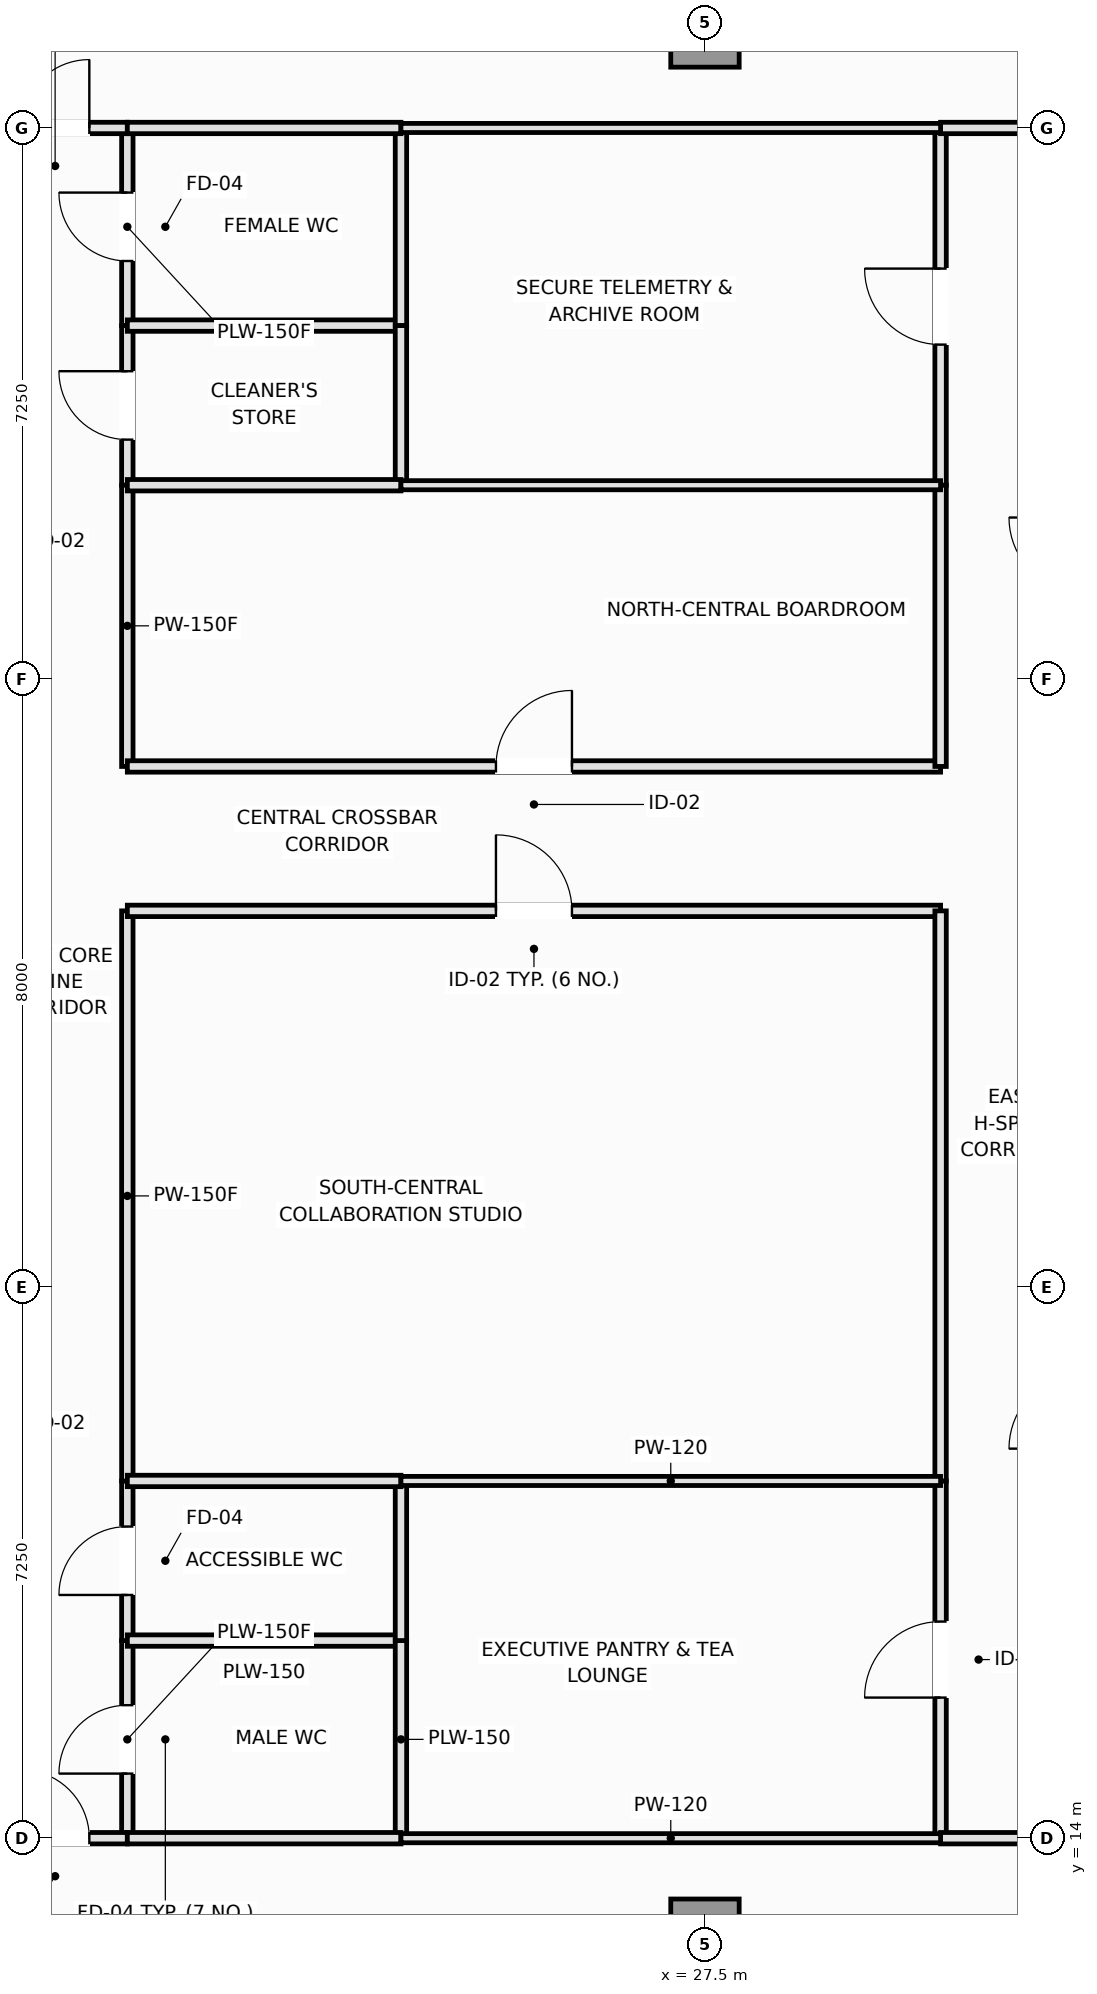
"""IFC4 building model, lengths in metres.
Left out: names, types, materials, properties, quantities, classifications, styles, units other than length and angle.
Written with IfcOpenShell. Run it as: python <this file> out.ifc"""

import sys

from ifc_helpers import new_model, si_unit, direction, frame, frame_2d, origin, origin_2d, place, context, subcontext, project, spatial, rectangle, extrude, element, fill, save


model = new_model("IFC4")
c1 = context("Model", 3, precision=1e-05, world=origin(), true_north=direction((0.0, 1.0)))
c2 = subcontext(c1, "Body", "Model", "MODEL_VIEW")
j1 = project(units=[si_unit("LENGTHUNIT", "METRE"), si_unit("PLANEANGLEUNIT", "RADIAN")], contexts=[c1])
p1 = place(None, origin())
s1 = spatial("IfcSite", under=j1, at=p1, CompositionType="ELEMENT")
p2 = place(p1, origin())
s2 = spatial("IfcBuilding", under=s1, at=p2, CompositionType="ELEMENT")
p3 = place(p2, frame((0.0, 0.0, 259.9)))
s3 = spatial("IfcBuildingStorey", under=s2, at=p3, CompositionType="ELEMENT", Elevation=259.9)
for number, where, z_axis, x_axis in (
    (1, (27.5, 12.75, 0.0), (0.0, 0.0, 1.0), (1.0, 0.0, 0.0)),
    (2, (27.5, 37.75, 0.0), (0.0, 0.0, 1.0), (1.0, 0.0, 0.0)),
):
    element("IfcColumn", number, at=place(p3, frame(where, z_axis=z_axis, x_axis=x_axis)), inside=s3, PredefinedType="COLUMN", context=c2, shape_type="SweptSolid", body=[
        extrude(rectangle(XDim=0.9, YDim=0.9, at=origin_2d()), origin(), (0.0, 0.0, 1.0), 3.55),
    ])
p4 = place(p3, frame((19.9, 14.0, 0.0), z_axis=(0.0, 0.0, 1.0), x_axis=(0.0, 1.0, 0.0)))
e3 = element("IfcWall", 3, at=p4, inside=s3, PredefinedType="PLUMBINGWALL", context=c2, shape_type="SweptSolid", body=[
    extrude(rectangle(XDim=2.6, YDim=0.15, at=frame_2d((1.3, 0.0))), origin(), (0.0, 0.0, 1.0), 3.39),
])
p5 = place(p4, frame((0.85, 0.0, 0.0)))
e4 = element("IfcOpeningElement", 4, at=p5, cuts=e3, PredefinedType="OPENING", context=c2, shape_type="SweptSolid", body=[
    extrude(rectangle(XDim=0.9, YDim=2.1, at=frame_2d((0.45, 1.05))), frame((0.0, 0.085, 0.0), z_axis=(0.0, -1.0, 0.0), x_axis=(1.0, 0.0, 0.0)), (0.0, 0.0, 1.0), 0.17),
])
p6 = place(p3, frame((19.9, 33.9, 0.0), z_axis=(0.0, 0.0, 1.0), x_axis=(0.0, 1.0, 0.0)))
e5 = element("IfcWall", 5, at=p6, inside=s3, PredefinedType="PLUMBINGWALL", context=c2, shape_type="SweptSolid", body=[
    extrude(rectangle(XDim=2.6, YDim=0.15, at=frame_2d((1.3, 0.0))), origin(), (0.0, 0.0, 1.0), 3.39),
])
p7 = place(p6, frame((0.85, 0.0, 0.0)))
e6 = element("IfcOpeningElement", 6, at=p7, cuts=e5, PredefinedType="OPENING", context=c2, shape_type="SweptSolid", body=[
    extrude(rectangle(XDim=0.9, YDim=2.1, at=frame_2d((0.45, 1.05))), frame((0.0, 0.085, 0.0), z_axis=(0.0, -1.0, 0.0), x_axis=(1.0, 0.0, 0.0)), (0.0, 0.0, 1.0), 0.17),
])
p8 = place(p3, frame((19.9, 16.6, 0.0), z_axis=(0.0, 0.0, 1.0), x_axis=(0.0, 1.0, 0.0)))
e7 = element("IfcWall", 7, at=p8, inside=s3, PredefinedType="PLUMBINGWALL", context=c2, shape_type="SweptSolid", body=[
    extrude(rectangle(XDim=2.1, YDim=0.15, at=frame_2d((1.05, 0.0))), origin(), (0.0, 0.0, 1.0), 3.39),
])
p9 = place(p8, frame((0.6, 0.0, 0.0)))
e8 = element("IfcOpeningElement", 8, at=p9, cuts=e7, PredefinedType="OPENING", context=c2, shape_type="SweptSolid", body=[
    extrude(rectangle(XDim=0.9, YDim=2.1, at=frame_2d((0.45, 1.05))), frame((0.0, 0.085, 0.0), z_axis=(0.0, -1.0, 0.0), x_axis=(1.0, 0.0, 0.0)), (0.0, 0.0, 1.0), 0.17),
])
p10 = place(p3, frame((19.9, 31.8, 0.0), z_axis=(0.0, 0.0, 1.0), x_axis=(0.0, 1.0, 0.0)))
e9 = element("IfcWall", 9, at=p10, inside=s3, PredefinedType="PLUMBINGWALL", context=c2, shape_type="SweptSolid", body=[
    extrude(rectangle(XDim=2.1, YDim=0.15, at=frame_2d((1.05, 0.0))), origin(), (0.0, 0.0, 1.0), 3.39),
])
p11 = place(p10, frame((0.6, 0.0, 0.0)))
e10 = element("IfcOpeningElement", 10, at=p11, cuts=e9, PredefinedType="OPENING", context=c2, shape_type="SweptSolid", body=[
    extrude(rectangle(XDim=0.9, YDim=2.1, at=frame_2d((0.45, 1.05))), frame((0.0, 0.085, 0.0), z_axis=(0.0, -1.0, 0.0), x_axis=(1.0, 0.0, 0.0)), (0.0, 0.0, 1.0), 0.17),
])
p12 = place(p3, frame((19.9, 18.7, 0.0), z_axis=(0.0, 0.0, 1.0), x_axis=(0.0, 1.0, 0.0)))
e11 = element("IfcWall", 11, at=p12, inside=s3, PredefinedType="PARTITIONING", context=c2, shape_type="SweptSolid", body=[
    extrude(rectangle(XDim=7.5, YDim=0.15, at=frame_2d((3.75, 0.0))), origin(), (0.0, 0.0, 1.0), 3.39),
])
p13 = place(p3, frame((19.9, 28.1, 0.0), z_axis=(0.0, 0.0, 1.0), x_axis=(0.0, 1.0, 0.0)))
e12 = element("IfcWall", 12, at=p13, inside=s3, PredefinedType="PARTITIONING", context=c2, shape_type="SweptSolid", body=[
    extrude(rectangle(XDim=3.7, YDim=0.15, at=frame_2d((1.85, 0.0))), origin(), (0.0, 0.0, 1.0), 3.39),
])
p14 = place(p3, frame((18.0, 14.0, 0.0), z_axis=(0.0, 0.0, 1.0), x_axis=(1.0, 0.0, 0.0)))
e13 = element("IfcWall", 13, at=p14, inside=s3, PredefinedType="PARTITIONING", context=c2, shape_type="SweptSolid", body=[
    extrude(rectangle(XDim=1.9, YDim=0.15, at=frame_2d((0.95, 0.0))), origin(), (0.0, 0.0, 1.0), 3.39),
])
p15 = place(p14, frame((0.5, 0.0, 0.0)))
e14 = element("IfcOpeningElement", 14, at=p15, cuts=e13, PredefinedType="OPENING", context=c2, shape_type="SweptSolid", body=[
    extrude(rectangle(XDim=0.9, YDim=2.1, at=frame_2d((0.45, 1.05))), frame((0.0, 0.085, 0.0), z_axis=(0.0, -1.0, 0.0), x_axis=(1.0, 0.0, 0.0)), (0.0, 0.0, 1.0), 0.17),
])
p16 = place(p3, frame((18.0, 36.5, 0.0), z_axis=(0.0, 0.0, 1.0), x_axis=(1.0, 0.0, 0.0)))
e15 = element("IfcWall", 15, at=p16, inside=s3, PredefinedType="PARTITIONING", context=c2, shape_type="SweptSolid", body=[
    extrude(rectangle(XDim=1.9, YDim=0.15, at=frame_2d((0.95, 0.0))), origin(), (0.0, 0.0, 1.0), 3.39),
])
p17 = place(p16, frame((0.5, 0.0, 0.0)))
e16 = element("IfcOpeningElement", 16, at=p17, cuts=e15, PredefinedType="OPENING", context=c2, shape_type="SweptSolid", body=[
    extrude(rectangle(XDim=0.9, YDim=2.1, at=frame_2d((0.45, 1.05))), frame((0.0, 0.085, 0.0), z_axis=(0.0, -1.0, 0.0), x_axis=(1.0, 0.0, 0.0)), (0.0, 0.0, 1.0), 0.17),
])
p18 = place(p3, frame((19.9, 26.2, 0.0), z_axis=(0.0, 0.0, 1.0), x_axis=(1.0, 0.0, 0.0)))
e17 = element("IfcWall", 17, at=p18, inside=s3, PredefinedType="PARTITIONING", context=c2, shape_type="SweptSolid", body=[
    extrude(rectangle(XDim=10.7, YDim=0.15, at=frame_2d((5.35, 0.0))), origin(), (0.0, 0.0, 1.0), 3.39),
])
p19 = place(p18, frame((4.85, 0.0, 0.0)))
e18 = element("IfcOpeningElement", 18, at=p19, cuts=e17, PredefinedType="OPENING", context=c2, shape_type="SweptSolid", body=[
    extrude(rectangle(XDim=1.0, YDim=2.15, at=frame_2d((0.5, 1.075))), frame((0.0, 0.085, 0.0), z_axis=(0.0, -1.0, 0.0), x_axis=(1.0, 0.0, 0.0)), (0.0, 0.0, 1.0), 0.17),
])
p20 = place(p3, frame((19.9, 28.1, 0.0), z_axis=(0.0, 0.0, 1.0), x_axis=(1.0, 0.0, 0.0)))
e19 = element("IfcWall", 19, at=p20, inside=s3, PredefinedType="PARTITIONING", context=c2, shape_type="SweptSolid", body=[
    extrude(rectangle(XDim=10.7, YDim=0.15, at=frame_2d((5.35, 0.0))), origin(), (0.0, 0.0, 1.0), 3.39),
])
p21 = place(p20, frame((4.85, 0.0, 0.0)))
e20 = element("IfcOpeningElement", 20, at=p21, cuts=e19, PredefinedType="OPENING", context=c2, shape_type="SweptSolid", body=[
    extrude(rectangle(XDim=1.0, YDim=2.15, at=frame_2d((0.5, 1.075))), frame((0.0, 0.085, 0.0), z_axis=(0.0, -1.0, 0.0), x_axis=(1.0, 0.0, 0.0)), (0.0, 0.0, 1.0), 0.17),
])
p22 = place(p3, frame((30.6, 14.0, 0.0), z_axis=(0.0, 0.0, 1.0), x_axis=(0.0, 1.0, 0.0)))
e21 = element("IfcWall", 21, at=p22, inside=s3, PredefinedType="PARTITIONING", context=c2, shape_type="SweptSolid", body=[
    extrude(rectangle(XDim=4.7, YDim=0.15, at=frame_2d((2.35, 0.0))), origin(), (0.0, 0.0, 1.0), 3.39),
])
p23 = place(p22, frame((1.85, 0.0, 0.0)))
e22 = element("IfcOpeningElement", 22, at=p23, cuts=e21, PredefinedType="OPENING", context=c2, shape_type="SweptSolid", body=[
    extrude(rectangle(XDim=1.0, YDim=2.15, at=frame_2d((0.5, 1.075))), frame((0.0, 0.085, 0.0), z_axis=(0.0, -1.0, 0.0), x_axis=(1.0, 0.0, 0.0)), (0.0, 0.0, 1.0), 0.17),
])
p24 = place(p3, frame((30.6, 31.8, 0.0), z_axis=(0.0, 0.0, 1.0), x_axis=(0.0, 1.0, 0.0)))
e23 = element("IfcWall", 23, at=p24, inside=s3, PredefinedType="PARTITIONING", context=c2, shape_type="SweptSolid", body=[
    extrude(rectangle(XDim=4.7, YDim=0.15, at=frame_2d((2.35, 0.0))), origin(), (0.0, 0.0, 1.0), 3.39),
])
p25 = place(p24, frame((1.85, 0.0, 0.0)))
e24 = element("IfcOpeningElement", 24, at=p25, cuts=e23, PredefinedType="OPENING", context=c2, shape_type="SweptSolid", body=[
    extrude(rectangle(XDim=1.0, YDim=2.15, at=frame_2d((0.5, 1.075))), frame((0.0, 0.085, 0.0), z_axis=(0.0, -1.0, 0.0), x_axis=(1.0, 0.0, 0.0)), (0.0, 0.0, 1.0), 0.17),
])
p26 = place(p3, frame((30.6, 18.7, 0.0), z_axis=(0.0, 0.0, 1.0), x_axis=(0.0, 1.0, 0.0)))
e25 = element("IfcWall", 25, at=p26, inside=s3, PredefinedType="PARTITIONING", context=c2, shape_type="SweptSolid", body=[
    extrude(rectangle(XDim=7.5, YDim=0.15, at=frame_2d((3.75, 0.0))), origin(), (0.0, 0.0, 1.0), 3.39),
])
p27 = place(p3, frame((30.6, 28.1, 0.0), z_axis=(0.0, 0.0, 1.0), x_axis=(0.0, 1.0, 0.0)))
e26 = element("IfcWall", 26, at=p27, inside=s3, PredefinedType="PARTITIONING", context=c2, shape_type="SweptSolid", body=[
    extrude(rectangle(XDim=3.7, YDim=0.15, at=frame_2d((1.85, 0.0))), origin(), (0.0, 0.0, 1.0), 3.39),
])
for number, where, z_axis, x_axis in (
    (27, (30.6, 14.0, 0.0), (0.0, 0.0, 1.0), (1.0, 0.0, 0.0)),
    (28, (30.6, 36.5, 0.0), (0.0, 0.0, 1.0), (1.0, 0.0, 0.0)),
):
    element("IfcWall", number, at=place(p3, frame(where, z_axis=z_axis, x_axis=x_axis)), inside=s3, PredefinedType="PARTITIONING", context=c2, shape_type="SweptSolid", body=[
        extrude(rectangle(XDim=1.9, YDim=0.15, at=frame_2d((0.95, 0.0))), origin(), (0.0, 0.0, 1.0), 3.39),
    ])
p28 = place(p3, frame((19.9, 16.6, 0.0), z_axis=(0.0, 0.0, 1.0), x_axis=(1.0, 0.0, 0.0)))
e29 = element("IfcWall", 29, at=p28, inside=s3, PredefinedType="PLUMBINGWALL", context=c2, shape_type="SweptSolid", body=[
    extrude(rectangle(XDim=3.6, YDim=0.15, at=frame_2d((1.8, 0.0))), origin(), (0.0, 0.0, 1.0), 3.39),
])
p29 = place(p3, frame((23.5, 14.0, 0.0), z_axis=(0.0, 0.0, 1.0), x_axis=(0.0, 1.0, 0.0)))
e30 = element("IfcWall", 30, at=p29, inside=s3, PredefinedType="PLUMBINGWALL", context=c2, shape_type="SweptSolid", body=[
    extrude(rectangle(XDim=2.6, YDim=0.15, at=frame_2d((1.3, 0.0))), origin(), (0.0, 0.0, 1.0), 3.39),
])
for number, where, z_axis, x_axis in (
    (31, (19.9, 14.0, 0.0), (0.0, 0.0, 1.0), (1.0, 0.0, 0.0)),
    (32, (19.9, 33.9, 0.0), (0.0, 0.0, 1.0), (1.0, 0.0, 0.0)),
):
    element("IfcWall", number, at=place(p3, frame(where, z_axis=z_axis, x_axis=x_axis)), inside=s3, PredefinedType="PLUMBINGWALL", context=c2, shape_type="SweptSolid", body=[
        extrude(rectangle(XDim=3.6, YDim=0.15, at=frame_2d((1.8, 0.0))), origin(), (0.0, 0.0, 1.0), 3.39),
    ])
p30 = place(p3, frame((23.5, 33.9, 0.0), z_axis=(0.0, 0.0, 1.0), x_axis=(0.0, 1.0, 0.0)))
e33 = element("IfcWall", 33, at=p30, inside=s3, PredefinedType="PLUMBINGWALL", context=c2, shape_type="SweptSolid", body=[
    extrude(rectangle(XDim=2.6, YDim=0.15, at=frame_2d((1.3, 0.0))), origin(), (0.0, 0.0, 1.0), 3.39),
])
p31 = place(p3, frame((19.9, 36.5, 0.0), z_axis=(0.0, 0.0, 1.0), x_axis=(1.0, 0.0, 0.0)))
e34 = element("IfcWall", 34, at=p31, inside=s3, PredefinedType="PLUMBINGWALL", context=c2, shape_type="SweptSolid", body=[
    extrude(rectangle(XDim=3.6, YDim=0.15, at=frame_2d((1.8, 0.0))), origin(), (0.0, 0.0, 1.0), 3.39),
])
p32 = place(p3, frame((23.5, 16.6, 0.0), z_axis=(0.0, 0.0, 1.0), x_axis=(0.0, 1.0, 0.0)))
e35 = element("IfcWall", 35, at=p32, inside=s3, PredefinedType="PLUMBINGWALL", context=c2, shape_type="SweptSolid", body=[
    extrude(rectangle(XDim=2.1, YDim=0.15, at=frame_2d((1.05, 0.0))), origin(), (0.0, 0.0, 1.0), 3.39),
])
p33 = place(p3, frame((19.9, 18.7, 0.0), z_axis=(0.0, 0.0, 1.0), x_axis=(1.0, 0.0, 0.0)))
e36 = element("IfcWall", 36, at=p33, inside=s3, PredefinedType="PLUMBINGWALL", context=c2, shape_type="SweptSolid", body=[
    extrude(rectangle(XDim=3.6, YDim=0.15, at=frame_2d((1.8, 0.0))), origin(), (0.0, 0.0, 1.0), 3.39),
])
p34 = place(p3, frame((23.5, 31.8, 0.0), z_axis=(0.0, 0.0, 1.0), x_axis=(0.0, 1.0, 0.0)))
e37 = element("IfcWall", 37, at=p34, inside=s3, PredefinedType="PLUMBINGWALL", context=c2, shape_type="SweptSolid", body=[
    extrude(rectangle(XDim=2.1, YDim=0.15, at=frame_2d((1.05, 0.0))), origin(), (0.0, 0.0, 1.0), 3.39),
])
p35 = place(p3, frame((19.9, 31.8, 0.0), z_axis=(0.0, 0.0, 1.0), x_axis=(1.0, 0.0, 0.0)))
e38 = element("IfcWall", 38, at=p35, inside=s3, PredefinedType="PLUMBINGWALL", context=c2, shape_type="SweptSolid", body=[
    extrude(rectangle(XDim=3.6, YDim=0.15, at=frame_2d((1.8, 0.0))), origin(), (0.0, 0.0, 1.0), 3.39),
])
for number, where, z_axis, x_axis in (
    (39, (23.5, 18.7, 0.0), (0.0, 0.0, 1.0), (1.0, 0.0, 0.0)),
    (40, (23.5, 14.0, 0.0), (0.0, 0.0, 1.0), (1.0, 0.0, 0.0)),
    (41, (23.5, 31.8, 0.0), (0.0, 0.0, 1.0), (1.0, 0.0, 0.0)),
    (42, (23.5, 36.5, 0.0), (0.0, 0.0, 1.0), (1.0, 0.0, 0.0)),
):
    element("IfcWall", number, at=place(p3, frame(where, z_axis=z_axis, x_axis=x_axis)), inside=s3, PredefinedType="PARTITIONING", context=c2, shape_type="SweptSolid", body=[
        extrude(rectangle(XDim=7.1, YDim=0.12, at=frame_2d((3.55, 0.0))), origin(), (0.0, 0.0, 1.0), 3.39),
    ])
p36 = place(p5, origin())
e43 = element("IfcDoor", 43, at=p36, inside=s3, OperationType="SINGLE_SWING_LEFT", PredefinedType="DOOR", context=c2, shape_type="SweptSolid", body=[
    extrude(rectangle(XDim=0.9, YDim=2.1, at=frame_2d((0.45, 1.05))), frame((0.0, 0.025, 0.0), z_axis=(0.0, -1.0, 0.0), x_axis=(1.0, 0.0, 0.0)), (0.0, 0.0, 1.0), 0.05),
])
fill(e4, e43)
p37 = place(p7, origin())
e44 = element("IfcDoor", 44, at=p37, inside=s3, OperationType="SINGLE_SWING_RIGHT", PredefinedType="DOOR", context=c2, shape_type="SweptSolid", body=[
    extrude(rectangle(XDim=0.9, YDim=2.1, at=frame_2d((0.45, 1.05))), frame((0.0, 0.025, 0.0), z_axis=(0.0, -1.0, 0.0), x_axis=(1.0, 0.0, 0.0)), (0.0, 0.0, 1.0), 0.05),
])
fill(e6, e44)
p38 = place(p9, origin())
e45 = element("IfcDoor", 45, at=p38, inside=s3, OperationType="SINGLE_SWING_LEFT", PredefinedType="DOOR", context=c2, shape_type="SweptSolid", body=[
    extrude(rectangle(XDim=0.9, YDim=2.1, at=frame_2d((0.45, 1.05))), frame((0.0, 0.025, 0.0), z_axis=(0.0, -1.0, 0.0), x_axis=(1.0, 0.0, 0.0)), (0.0, 0.0, 1.0), 0.05),
])
fill(e8, e45)
p39 = place(p11, origin())
e46 = element("IfcDoor", 46, at=p39, inside=s3, OperationType="SINGLE_SWING_RIGHT", PredefinedType="DOOR", context=c2, shape_type="SweptSolid", body=[
    extrude(rectangle(XDim=0.9, YDim=2.1, at=frame_2d((0.45, 1.05))), frame((0.0, 0.025, 0.0), z_axis=(0.0, -1.0, 0.0), x_axis=(1.0, 0.0, 0.0)), (0.0, 0.0, 1.0), 0.05),
])
fill(e10, e46)
p40 = place(p15, origin())
e47 = element("IfcDoor", 47, at=p40, inside=s3, OperationType="SINGLE_SWING_LEFT", PredefinedType="DOOR", context=c2, shape_type="SweptSolid", body=[
    extrude(rectangle(XDim=0.9, YDim=2.1, at=frame_2d((0.45, 1.05))), frame((0.0, 0.025, 0.0), z_axis=(0.0, -1.0, 0.0), x_axis=(1.0, 0.0, 0.0)), (0.0, 0.0, 1.0), 0.05),
])
fill(e14, e47)
p41 = place(p17, origin())
e48 = element("IfcDoor", 48, at=p41, inside=s3, OperationType="SINGLE_SWING_RIGHT", PredefinedType="DOOR", context=c2, shape_type="SweptSolid", body=[
    extrude(rectangle(XDim=0.9, YDim=2.1, at=frame_2d((0.45, 1.05))), frame((0.0, 0.025, 0.0), z_axis=(0.0, -1.0, 0.0), x_axis=(1.0, 0.0, 0.0)), (0.0, 0.0, 1.0), 0.05),
])
fill(e16, e48)
p42 = place(p19, origin())
e49 = element("IfcDoor", 49, at=p42, inside=s3, OperationType="SINGLE_SWING_LEFT", PredefinedType="DOOR", context=c2, shape_type="SweptSolid", body=[
    extrude(rectangle(XDim=1.0, YDim=2.15, at=frame_2d((0.5, 1.075))), frame((0.0, 0.025, 0.0), z_axis=(0.0, -1.0, 0.0), x_axis=(1.0, 0.0, 0.0)), (0.0, 0.0, 1.0), 0.05),
])
fill(e18, e49)
p43 = place(p21, origin())
e50 = element("IfcDoor", 50, at=p43, inside=s3, OperationType="SINGLE_SWING_RIGHT", PredefinedType="DOOR", context=c2, shape_type="SweptSolid", body=[
    extrude(rectangle(XDim=1.0, YDim=2.15, at=frame_2d((0.5, 1.075))), frame((0.0, 0.025, 0.0), z_axis=(0.0, -1.0, 0.0), x_axis=(1.0, 0.0, 0.0)), (0.0, 0.0, 1.0), 0.05),
])
fill(e20, e50)
p44 = place(p23, origin())
e51 = element("IfcDoor", 51, at=p44, inside=s3, OperationType="SINGLE_SWING_LEFT", PredefinedType="DOOR", context=c2, shape_type="SweptSolid", body=[
    extrude(rectangle(XDim=1.0, YDim=2.15, at=frame_2d((0.5, 1.075))), frame((0.0, 0.025, 0.0), z_axis=(0.0, -1.0, 0.0), x_axis=(1.0, 0.0, 0.0)), (0.0, 0.0, 1.0), 0.05),
])
fill(e22, e51)
p45 = place(p25, origin())
e52 = element("IfcDoor", 52, at=p45, inside=s3, OperationType="SINGLE_SWING_RIGHT", PredefinedType="DOOR", context=c2, shape_type="SweptSolid", body=[
    extrude(rectangle(XDim=1.0, YDim=2.15, at=frame_2d((0.5, 1.075))), frame((0.0, 0.025, 0.0), z_axis=(0.0, -1.0, 0.0), x_axis=(1.0, 0.0, 0.0)), (0.0, 0.0, 1.0), 0.05),
])
fill(e24, e52)
save(model, sys.argv[1])
